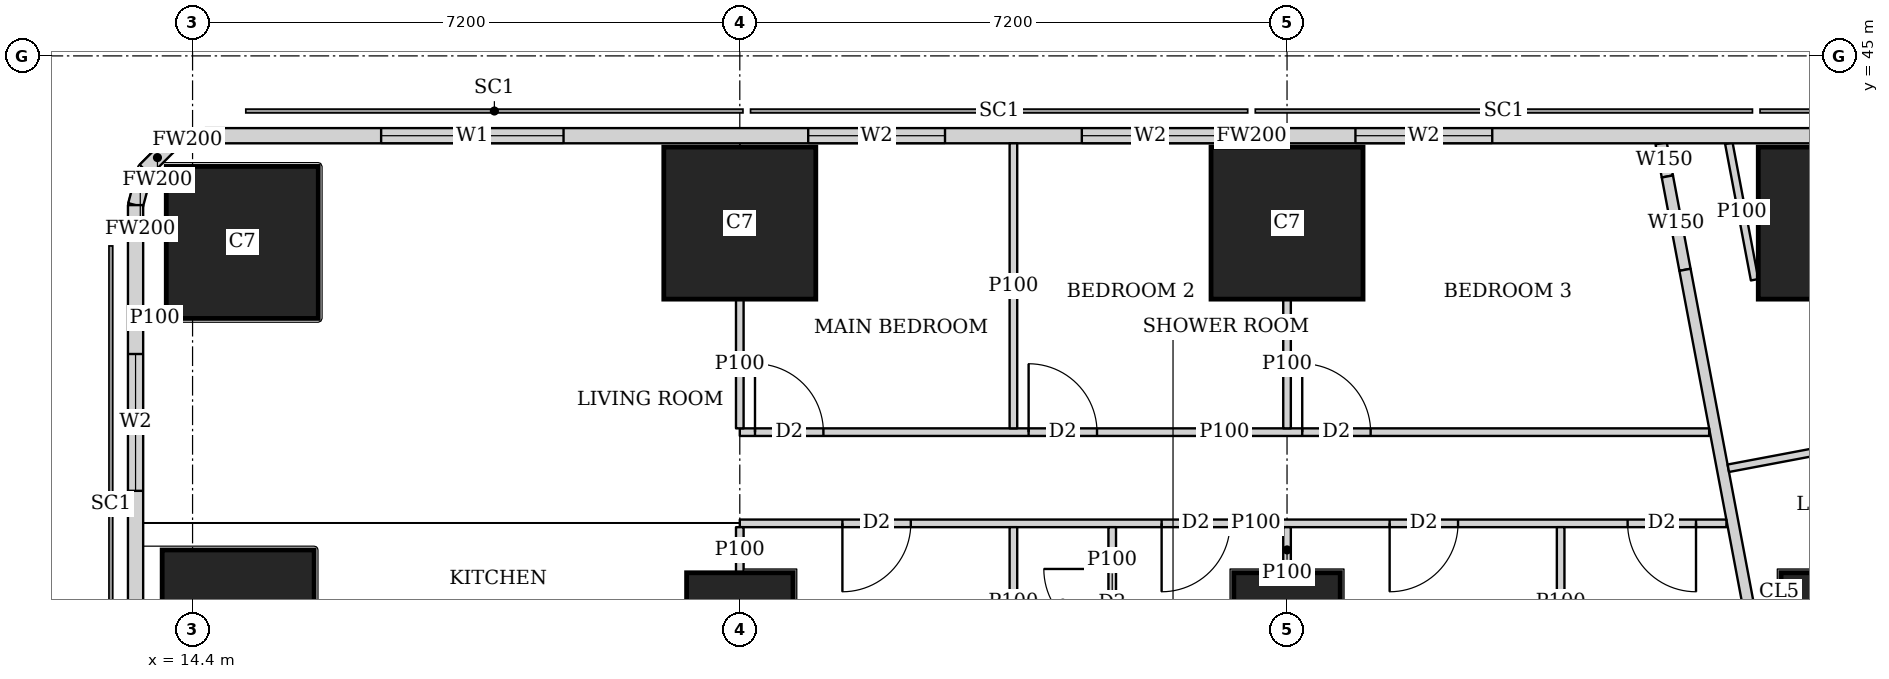
"""IFC4 building model, lengths in metres.
Left out: names, types, materials, properties, quantities, classifications, styles, units other than length and angle.
Written with IfcOpenShell. Run it as: python <this file> out.ifc"""

import sys

from ifc_helpers import new_model, si_unit, direction, frame, frame_2d, origin, origin_2d, place, context, subcontext, project, spatial, rectangle, extrude, element, fill, save


model = new_model("IFC4")
c1 = context("Model", 3, precision=1e-05, world=origin(), true_north=direction((0.0, 1.0)))
c2 = subcontext(c1, "Body", "Model", "MODEL_VIEW")
j1 = project(units=[si_unit("LENGTHUNIT", "METRE"), si_unit("PLANEANGLEUNIT", "RADIAN")], contexts=[c1])
p1 = place(None, origin())
s1 = spatial("IfcSite", under=j1, at=p1, CompositionType="ELEMENT")
p2 = place(p1, origin())
s2 = spatial("IfcBuilding", under=s1, at=p2, CompositionType="ELEMENT")
p3 = place(p2, frame((0.0, 0.0, 262.85)))
s3 = spatial("IfcBuildingStorey", under=s2, at=p3, CompositionType="ELEMENT", Elevation=262.85)
p4 = place(p3, frame((15.0, 37.5, 0.0), z_axis=(0.0, 0.0, 1.0), x_axis=(1.0, 0.0, 0.0)))
e1 = element("IfcColumn", 1, at=p4, inside=s3, PredefinedType="COLUMN", context=c2, shape_type="SweptSolid", body=[
    extrude(rectangle(XDim=2.0, YDim=2.0, at=origin_2d()), origin(), (0.0, 0.0, 1.0), 3.75),
])
for number, where, z_axis, x_axis in (
    (2, (21.6, 37.5, 0.0), (0.0, 0.0, 1.0), (1.0, 0.0, 0.0)),
    (3, (28.8, 37.5, 0.0), (0.0, 0.0, 1.0), (1.0, 0.0, 0.0)),
    (4, (36.0, 37.5, 0.0), (0.0, 0.0, 1.0), (1.0, 0.0, 0.0)),
):
    element("IfcColumn", number, at=place(p3, frame(where, z_axis=z_axis, x_axis=x_axis)), inside=s3, PredefinedType="COLUMN", context=c2, shape_type="SweptSolid", body=[
        extrude(rectangle(XDim=1.4, YDim=1.4, at=origin_2d()), origin(), (0.0, 0.0, 1.0), 3.75),
    ])
for number, where, z_axis, x_axis in (
    (5, (15.054, 42.546, 0.0), (0.0, 0.0, 1.0), (1.0, 0.0, 0.0)),
    (6, (21.6, 42.8, 0.0), (0.0, 0.0, 1.0), (1.0, 0.0, 0.0)),
    (7, (28.8, 42.8, 0.0), (0.0, 0.0, 1.0), (1.0, 0.0, 0.0)),
    (8, (36.0, 42.8, 0.0), (0.0, 0.0, 1.0), (1.0, 0.0, 0.0)),
):
    element("IfcColumn", number, at=place(p3, frame(where, z_axis=z_axis, x_axis=x_axis)), inside=s3, PredefinedType="COLUMN", context=c2, shape_type="SweptSolid", body=[
        extrude(rectangle(XDim=2.0, YDim=2.0, at=origin_2d()), origin(), (0.0, 0.0, 1.0), 3.75),
    ])
p5 = place(p3, frame((42.103, 43.95, 0.0), z_axis=(0.0, 0.0, 1.0), x_axis=(-1.0, 0.0, 0.0)))
e9 = element("IfcWall", 9, at=p5, inside=s3, PredefinedType="SOLIDWALL", context=c2, shape_type="SweptSolid", body=[
    extrude(rectangle(XDim=27.54, YDim=0.2, at=frame_2d((13.77, 0.0))), origin(), (0.0, 0.0, 1.0), 3.5),
])
p6 = place(p5, frame((10.603, 0.0, 0.9)))
e10 = element("IfcOpeningElement", 10, at=p6, cuts=e9, PredefinedType="OPENING", context=c2, shape_type="SweptSolid", body=[
    extrude(rectangle(XDim=1.8, YDim=1.5, at=frame_2d((0.9, 0.75))), frame((0.0, 0.11, 0.0), z_axis=(0.0, -1.0, 0.0), x_axis=(1.0, 0.0, 0.0)), (0.0, 0.0, 1.0), 0.22),
])
p7 = place(p5, frame((14.203, 0.0, 0.9)))
e11 = element("IfcOpeningElement", 11, at=p7, cuts=e9, PredefinedType="OPENING", context=c2, shape_type="SweptSolid", body=[
    extrude(rectangle(XDim=1.8, YDim=1.5, at=frame_2d((0.9, 0.75))), frame((0.0, 0.11, 0.0), z_axis=(0.0, -1.0, 0.0), x_axis=(1.0, 0.0, 0.0)), (0.0, 0.0, 1.0), 0.22),
])
p8 = place(p5, frame((17.803, 0.0, 0.9)))
e12 = element("IfcOpeningElement", 12, at=p8, cuts=e9, PredefinedType="OPENING", context=c2, shape_type="SweptSolid", body=[
    extrude(rectangle(XDim=1.8, YDim=1.5, at=frame_2d((0.9, 0.75))), frame((0.0, 0.11, 0.0), z_axis=(0.0, -1.0, 0.0), x_axis=(1.0, 0.0, 0.0)), (0.0, 0.0, 1.0), 0.22),
])
p9 = place(p5, frame((22.822, 0.0, 0.9)))
e13 = element("IfcOpeningElement", 13, at=p9, cuts=e9, PredefinedType="OPENING", context=c2, shape_type="SweptSolid", body=[
    extrude(rectangle(XDim=2.4, YDim=1.5, at=frame_2d((1.2, 0.75))), frame((0.0, 0.11, 0.0), z_axis=(0.0, -1.0, 0.0), x_axis=(1.0, 0.0, 0.0)), (0.0, 0.0, 1.0), 0.22),
])
p10 = place(p3, frame((14.563, 43.95, 0.0), z_axis=(0.0, 0.0, 1.0), x_axis=(-0.965655254015, -0.259826731483, 0.0)))
e14 = element("IfcWall", 14, at=p10, inside=s3, PredefinedType="SOLIDWALL", context=c2, shape_type="SweptSolid", body=[
    extrude(rectangle(XDim=0.477, YDim=0.2, at=frame_2d((0.239, 0.0))), origin(), (0.0, 0.0, 1.0), 3.5),
])
p11 = place(p3, frame((14.102, 43.826, 0.0), z_axis=(0.0, 0.0, 1.0), x_axis=(-0.707369890659, -0.706843573776, 0.0)))
e15 = element("IfcWall", 15, at=p11, inside=s3, PredefinedType="SOLIDWALL", context=c2, shape_type="SweptSolid", body=[
    extrude(rectangle(XDim=0.464, YDim=0.2, at=frame_2d((0.232, 0.0))), origin(), (0.0, 0.0, 1.0), 3.5),
])
p12 = place(p3, frame((13.774, 43.498, 0.0), z_axis=(0.0, 0.0, 1.0), x_axis=(-0.259826731483, -0.965655254015, 0.0)))
e16 = element("IfcWall", 16, at=p12, inside=s3, PredefinedType="SOLIDWALL", context=c2, shape_type="SweptSolid", body=[
    extrude(rectangle(XDim=0.477, YDim=0.2, at=frame_2d((0.239, 0.0))), origin(), (0.0, 0.0, 1.0), 3.5),
])
p13 = place(p3, frame((13.65, 43.037, 0.0), z_axis=(0.0, 0.0, 1.0), x_axis=(0.0, -1.0, 0.0)))
e17 = element("IfcWall", 17, at=p13, inside=s3, PredefinedType="SOLIDWALL", context=c2, shape_type="SweptSolid", body=[
    extrude(rectangle(XDim=35.374, YDim=0.2, at=frame_2d((17.687, 0.0))), origin(), (0.0, 0.0, 1.0), 3.5),
])
p14 = place(p13, frame((1.959, 0.0, 0.9)))
e18 = element("IfcOpeningElement", 18, at=p14, cuts=e17, PredefinedType="OPENING", context=c2, shape_type="SweptSolid", body=[
    extrude(rectangle(XDim=1.8, YDim=1.5, at=frame_2d((0.9, 0.75))), frame((0.0, 0.11, 0.0), z_axis=(0.0, -1.0, 0.0), x_axis=(1.0, 0.0, 0.0)), (0.0, 0.0, 1.0), 0.22),
])
p15 = place(p3, frame((33.722, 43.85, 0.0), z_axis=(0.0, 0.0, 1.0), x_axis=(0.184886516626, -0.982759877066, 0.0)))
e19 = element("IfcWall", 19, at=p15, inside=s3, PredefinedType="SOLIDWALL", context=c2, shape_type="SweptSolid", body=[
    extrude(rectangle(XDim=0.444, YDim=0.15, at=frame_2d((0.222, 0.0))), origin(), (0.0, 0.0, 1.0), 3.5),
])
p16 = place(p3, frame((33.804, 43.414, 0.0), z_axis=(0.0, 0.0, 1.0), x_axis=(0.185585816539, -0.982628060204, 0.0)))
e20 = element("IfcWall", 20, at=p16, inside=s3, PredefinedType="SOLIDWALL", context=c2, shape_type="SweptSolid", body=[
    extrude(rectangle(XDim=1.25, YDim=0.15, at=frame_2d((0.625, 0.0))), origin(), (0.0, 0.0, 1.0), 2.05),
])
p17 = place(p3, frame((34.036, 42.186, 0.0), z_axis=(0.0, 0.0, 1.0), x_axis=(0.185593518645, -0.9826266055, 0.0)))
e21 = element("IfcWall", 21, at=p17, inside=s3, PredefinedType="SOLIDWALL", context=c2, shape_type="SweptSolid", body=[
    extrude(rectangle(XDim=35.961, YDim=0.15, at=frame_2d((17.98, 0.0))), origin(), (0.0, 0.0, 1.0), 2.5),
])
p18 = place(p17, frame((15.529, 0.0, 0.0)))
e22 = element("IfcOpeningElement", 22, at=p18, cuts=e21, PredefinedType="OPENING", context=c2, shape_type="SweptSolid", body=[
    extrude(rectangle(XDim=1.0, YDim=2.1, at=frame_2d((0.5, 1.05))), frame((0.0, 0.085, 0.0), z_axis=(0.0, -1.0, 0.0), x_axis=(1.0, 0.0, 0.0)), (0.0, 0.0, 1.0), 0.17),
])
p19 = place(p17, frame((19.345, 0.0, 0.0)))
e23 = element("IfcOpeningElement", 23, at=p19, cuts=e21, PredefinedType="OPENING", context=c2, shape_type="SweptSolid", body=[
    extrude(rectangle(XDim=1.0, YDim=2.1, at=frame_2d((0.5, 1.05))), frame((0.0, 0.085, 0.0), z_axis=(0.0, -1.0, 0.0), x_axis=(1.0, 0.0, 0.0)), (0.0, 0.0, 1.0), 0.17),
])
p20 = place(p17, frame((30.594, 0.0, 0.0)))
e24 = element("IfcOpeningElement", 24, at=p20, cuts=e21, PredefinedType="OPENING", context=c2, shape_type="SweptSolid", body=[
    extrude(rectangle(XDim=1.0, YDim=2.1, at=frame_2d((0.5, 1.05))), frame((0.0, 0.085, 0.0), z_axis=(0.0, -1.0, 0.0), x_axis=(1.0, 0.0, 0.0)), (0.0, 0.0, 1.0), 0.17),
])
p21 = place(p3, frame((34.952, 42.055, 0.0), z_axis=(0.0, 0.0, 1.0), x_axis=(-0.185490642006, 0.98264603074, 0.0)))
e25 = element("IfcWall", 25, at=p21, inside=s3, PredefinedType="PARTITIONING", context=c2, shape_type="SweptSolid", body=[
    extrude(rectangle(XDim=1.827, YDim=0.1, at=frame_2d((0.914, 0.0))), origin(), (0.0, 0.0, 1.0), 2.05),
])
p22 = place(p3, frame((37.824, 40.182, 0.0), z_axis=(0.0, 0.0, 1.0), x_axis=(-0.982674977865, -0.185337227447, 0.0)))
e26 = element("IfcWall", 26, at=p22, inside=s3, PredefinedType="PARTITIONING", context=c2, shape_type="SweptSolid", body=[
    extrude(rectangle(XDim=3.275, YDim=0.1, at=frame_2d((1.637, 0.0))), origin(), (0.0, 0.0, 1.0), 3.5),
])
p23 = place(p3, frame((14.054, 41.546, 0.0), z_axis=(0.0, 0.0, 1.0), x_axis=(-1.0, 0.0, 0.0)))
e27 = element("IfcWall", 27, at=p23, inside=s3, PredefinedType="PARTITIONING", context=c2, shape_type="SweptSolid", body=[
    extrude(rectangle(XDim=0.304, YDim=0.1, at=frame_2d((0.152, 0.0))), origin(), (0.0, 0.0, 1.0), 3.5),
])
p24 = place(p3, frame((21.6, 40.05, 0.0), z_axis=(0.0, 0.0, 1.0), x_axis=(1.0, 0.0, 0.0)))
e28 = element("IfcWall", 28, at=p24, inside=s3, PredefinedType="PARTITIONING", context=c2, shape_type="SweptSolid", body=[
    extrude(rectangle(XDim=12.754, YDim=0.1, at=frame_2d((6.377, 0.0))), origin(), (0.0, 0.0, 1.0), 3.5),
])
p25 = place(p24, frame((0.2, 0.0, 0.0)))
e29 = element("IfcOpeningElement", 29, at=p25, cuts=e28, PredefinedType="OPENING", context=c2, shape_type="SweptSolid", body=[
    extrude(rectangle(XDim=0.9, YDim=2.1, at=frame_2d((0.45, 1.05))), frame((0.0, 0.06, 0.0), z_axis=(0.0, -1.0, 0.0), x_axis=(1.0, 0.0, 0.0)), (0.0, 0.0, 1.0), 0.12),
])
p26 = place(p24, frame((3.8, 0.0, 0.0)))
e30 = element("IfcOpeningElement", 30, at=p26, cuts=e28, PredefinedType="OPENING", context=c2, shape_type="SweptSolid", body=[
    extrude(rectangle(XDim=0.9, YDim=2.1, at=frame_2d((0.45, 1.05))), frame((0.0, 0.06, 0.0), z_axis=(0.0, -1.0, 0.0), x_axis=(1.0, 0.0, 0.0)), (0.0, 0.0, 1.0), 0.12),
])
p27 = place(p24, frame((7.4, 0.0, 0.0)))
e31 = element("IfcOpeningElement", 31, at=p27, cuts=e28, PredefinedType="OPENING", context=c2, shape_type="SweptSolid", body=[
    extrude(rectangle(XDim=0.9, YDim=2.1, at=frame_2d((0.45, 1.05))), frame((0.0, 0.06, 0.0), z_axis=(0.0, -1.0, 0.0), x_axis=(1.0, 0.0, 0.0)), (0.0, 0.0, 1.0), 0.12),
])
p28 = place(p3, frame((21.6, 38.85, 0.0), z_axis=(0.0, 0.0, 1.0), x_axis=(1.0, 0.0, 0.0)))
e32 = element("IfcWall", 32, at=p28, inside=s3, PredefinedType="PARTITIONING", context=c2, shape_type="SweptSolid", body=[
    extrude(rectangle(XDim=12.981, YDim=0.1, at=frame_2d((6.49, 0.0))), origin(), (0.0, 0.0, 1.0), 3.5),
])
p29 = place(p28, frame((1.35, 0.0, 0.0)))
e33 = element("IfcOpeningElement", 33, at=p29, cuts=e32, PredefinedType="OPENING", context=c2, shape_type="SweptSolid", body=[
    extrude(rectangle(XDim=0.9, YDim=2.1, at=frame_2d((0.45, 1.05))), frame((0.0, 0.06, 0.0), z_axis=(0.0, -1.0, 0.0), x_axis=(1.0, 0.0, 0.0)), (0.0, 0.0, 1.0), 0.12),
])
p30 = place(p28, frame((5.55, 0.0, 0.0)))
e34 = element("IfcOpeningElement", 34, at=p30, cuts=e32, PredefinedType="OPENING", context=c2, shape_type="SweptSolid", body=[
    extrude(rectangle(XDim=0.9, YDim=2.1, at=frame_2d((0.45, 1.05))), frame((0.0, 0.06, 0.0), z_axis=(0.0, -1.0, 0.0), x_axis=(1.0, 0.0, 0.0)), (0.0, 0.0, 1.0), 0.12),
])
p31 = place(p28, frame((8.55, 0.0, 0.0)))
e35 = element("IfcOpeningElement", 35, at=p31, cuts=e32, PredefinedType="OPENING", context=c2, shape_type="SweptSolid", body=[
    extrude(rectangle(XDim=0.9, YDim=2.1, at=frame_2d((0.45, 1.05))), frame((0.0, 0.06, 0.0), z_axis=(0.0, -1.0, 0.0), x_axis=(1.0, 0.0, 0.0)), (0.0, 0.0, 1.0), 0.12),
])
p32 = place(p28, frame((11.681, 0.0, 0.0)))
e36 = element("IfcOpeningElement", 36, at=p32, cuts=e32, PredefinedType="OPENING", context=c2, shape_type="SweptSolid", body=[
    extrude(rectangle(XDim=0.9, YDim=2.1, at=frame_2d((0.45, 1.05))), frame((0.0, 0.06, 0.0), z_axis=(0.0, -1.0, 0.0), x_axis=(1.0, 0.0, 0.0)), (0.0, 0.0, 1.0), 0.12),
])
p33 = place(p3, frame((21.6, 40.1, 0.0), z_axis=(0.0, 0.0, 1.0), x_axis=(0.0, 1.0, 0.0)))
e37 = element("IfcWall", 37, at=p33, inside=s3, PredefinedType="PARTITIONING", context=c2, shape_type="SweptSolid", body=[
    extrude(rectangle(XDim=1.699, YDim=0.1, at=frame_2d((0.85, 0.0))), origin(), (0.0, 0.0, 1.0), 3.5),
])
p34 = place(p3, frame((25.2, 40.1, 0.0), z_axis=(0.0, 0.0, 1.0), x_axis=(0.0, 1.0, 0.0)))
e38 = element("IfcWall", 38, at=p34, inside=s3, PredefinedType="PARTITIONING", context=c2, shape_type="SweptSolid", body=[
    extrude(rectangle(XDim=3.75, YDim=0.1, at=frame_2d((1.875, 0.0))), origin(), (0.0, 0.0, 1.0), 2.05),
])
p35 = place(p3, frame((28.8, 40.1, 0.0), z_axis=(0.0, 0.0, 1.0), x_axis=(0.0, 1.0, 0.0)))
e39 = element("IfcWall", 39, at=p35, inside=s3, PredefinedType="PARTITIONING", context=c2, shape_type="SweptSolid", body=[
    extrude(rectangle(XDim=1.699, YDim=0.1, at=frame_2d((0.85, 0.0))), origin(), (0.0, 0.0, 1.0), 3.5),
])
p36 = place(p3, frame((21.6, 38.201, 0.0), z_axis=(0.0, 0.0, 1.0), x_axis=(0.0, 1.0, 0.0)))
e40 = element("IfcWall", 40, at=p36, inside=s3, PredefinedType="PARTITIONING", context=c2, shape_type="SweptSolid", body=[
    extrude(rectangle(XDim=0.599, YDim=0.1, at=frame_2d((0.3, 0.0))), origin(), (0.0, 0.0, 1.0), 3.5),
])
p37 = place(p3, frame((25.2, 36.825, 0.0), z_axis=(0.0, 0.0, 1.0), x_axis=(0.0, 1.0, 0.0)))
e41 = element("IfcWall", 41, at=p37, inside=s3, PredefinedType="PARTITIONING", context=c2, shape_type="SweptSolid", body=[
    extrude(rectangle(XDim=1.975, YDim=0.1, at=frame_2d((0.988, 0.0))), origin(), (0.0, 0.0, 1.0), 3.5),
])
p38 = place(p3, frame((28.8, 38.201, 0.0), z_axis=(0.0, 0.0, 1.0), x_axis=(0.0, 1.0, 0.0)))
e42 = element("IfcWall", 42, at=p38, inside=s3, PredefinedType="PARTITIONING", context=c2, shape_type="SweptSolid", body=[
    extrude(rectangle(XDim=0.599, YDim=0.1, at=frame_2d((0.3, 0.0))), origin(), (0.0, 0.0, 1.0), 3.5),
])
p39 = place(p3, frame((32.4, 36.825, 0.0), z_axis=(0.0, 0.0, 1.0), x_axis=(0.0, 1.0, 0.0)))
e43 = element("IfcWall", 43, at=p39, inside=s3, PredefinedType="PARTITIONING", context=c2, shape_type="SweptSolid", body=[
    extrude(rectangle(XDim=1.975, YDim=0.1, at=frame_2d((0.988, 0.0))), origin(), (0.0, 0.0, 1.0), 3.5),
])
p40 = place(p3, frame((26.5, 36.825, 0.0), z_axis=(0.0, 0.0, 1.0), x_axis=(0.0, 1.0, 0.0)))
e44 = element("IfcWall", 44, at=p40, inside=s3, PredefinedType="PARTITIONING", context=c2, shape_type="SweptSolid", body=[
    extrude(rectangle(XDim=1.975, YDim=0.1, at=frame_2d((0.988, 0.0))), origin(), (0.0, 0.0, 1.0), 3.5),
])
p41 = place(p40, frame((0.525, 0.0, 0.0)))
e45 = element("IfcOpeningElement", 45, at=p41, cuts=e44, PredefinedType="OPENING", context=c2, shape_type="SweptSolid", body=[
    extrude(rectangle(XDim=0.9, YDim=2.1, at=frame_2d((0.45, 1.05))), frame((0.0, 0.06, 0.0), z_axis=(0.0, -1.0, 0.0), x_axis=(1.0, 0.0, 0.0)), (0.0, 0.0, 1.0), 0.12),
])
p42 = place(p6, origin())
e46 = element("IfcWindow", 46, at=p42, inside=s3, PartitioningType="SINGLE_PANEL", PredefinedType="WINDOW", context=c2, shape_type="SweptSolid", body=[
    extrude(rectangle(XDim=1.8, YDim=1.5, at=frame_2d((0.9, 0.75))), frame((0.0, 0.03, 0.0), z_axis=(0.0, -1.0, 0.0), x_axis=(1.0, 0.0, 0.0)), (0.0, 0.0, 1.0), 0.06),
])
fill(e10, e46)
p43 = place(p7, origin())
e47 = element("IfcWindow", 47, at=p43, inside=s3, PartitioningType="SINGLE_PANEL", PredefinedType="WINDOW", context=c2, shape_type="SweptSolid", body=[
    extrude(rectangle(XDim=1.8, YDim=1.5, at=frame_2d((0.9, 0.75))), frame((0.0, 0.03, 0.0), z_axis=(0.0, -1.0, 0.0), x_axis=(1.0, 0.0, 0.0)), (0.0, 0.0, 1.0), 0.06),
])
fill(e11, e47)
p44 = place(p8, origin())
e48 = element("IfcWindow", 48, at=p44, inside=s3, PartitioningType="SINGLE_PANEL", PredefinedType="WINDOW", context=c2, shape_type="SweptSolid", body=[
    extrude(rectangle(XDim=1.8, YDim=1.5, at=frame_2d((0.9, 0.75))), frame((0.0, 0.03, 0.0), z_axis=(0.0, -1.0, 0.0), x_axis=(1.0, 0.0, 0.0)), (0.0, 0.0, 1.0), 0.06),
])
fill(e12, e48)
p45 = place(p9, origin())
e49 = element("IfcWindow", 49, at=p45, inside=s3, PartitioningType="SINGLE_PANEL", PredefinedType="WINDOW", context=c2, shape_type="SweptSolid", body=[
    extrude(rectangle(XDim=2.4, YDim=1.5, at=frame_2d((1.2, 0.75))), frame((0.0, 0.03, 0.0), z_axis=(0.0, -1.0, 0.0), x_axis=(1.0, 0.0, 0.0)), (0.0, 0.0, 1.0), 0.06),
])
fill(e13, e49)
p46 = place(p14, origin())
e50 = element("IfcWindow", 50, at=p46, inside=s3, PartitioningType="SINGLE_PANEL", PredefinedType="WINDOW", context=c2, shape_type="SweptSolid", body=[
    extrude(rectangle(XDim=1.8, YDim=1.5, at=frame_2d((0.9, 0.75))), frame((0.0, 0.03, 0.0), z_axis=(0.0, -1.0, 0.0), x_axis=(1.0, 0.0, 0.0)), (0.0, 0.0, 1.0), 0.06),
])
fill(e18, e50)
p47 = place(p25, origin())
e51 = element("IfcDoor", 51, at=p47, inside=s3, OperationType="SINGLE_SWING_LEFT", PredefinedType="DOOR", context=c2, shape_type="SweptSolid", body=[
    extrude(rectangle(XDim=0.9, YDim=2.1, at=frame_2d((0.45, 1.05))), frame((0.0, 0.025, 0.0), z_axis=(0.0, -1.0, 0.0), x_axis=(1.0, 0.0, 0.0)), (0.0, 0.0, 1.0), 0.05),
])
fill(e29, e51)
p48 = place(p26, origin())
e52 = element("IfcDoor", 52, at=p48, inside=s3, OperationType="SINGLE_SWING_LEFT", PredefinedType="DOOR", context=c2, shape_type="SweptSolid", body=[
    extrude(rectangle(XDim=0.9, YDim=2.1, at=frame_2d((0.45, 1.05))), frame((0.0, 0.025, 0.0), z_axis=(0.0, -1.0, 0.0), x_axis=(1.0, 0.0, 0.0)), (0.0, 0.0, 1.0), 0.05),
])
fill(e30, e52)
p49 = place(p27, origin())
e53 = element("IfcDoor", 53, at=p49, inside=s3, OperationType="SINGLE_SWING_LEFT", PredefinedType="DOOR", context=c2, shape_type="SweptSolid", body=[
    extrude(rectangle(XDim=0.9, YDim=2.1, at=frame_2d((0.45, 1.05))), frame((0.0, 0.025, 0.0), z_axis=(0.0, -1.0, 0.0), x_axis=(1.0, 0.0, 0.0)), (0.0, 0.0, 1.0), 0.05),
])
fill(e31, e53)
p50 = place(p29, origin())
e54 = element("IfcDoor", 54, at=p50, inside=s3, OperationType="SINGLE_SWING_RIGHT", PredefinedType="DOOR", context=c2, shape_type="SweptSolid", body=[
    extrude(rectangle(XDim=0.9, YDim=2.1, at=frame_2d((0.45, 1.05))), frame((0.0, 0.025, 0.0), z_axis=(0.0, -1.0, 0.0), x_axis=(1.0, 0.0, 0.0)), (0.0, 0.0, 1.0), 0.05),
])
fill(e33, e54)
p51 = place(p30, origin())
e55 = element("IfcDoor", 55, at=p51, inside=s3, OperationType="SINGLE_SWING_RIGHT", PredefinedType="DOOR", context=c2, shape_type="SweptSolid", body=[
    extrude(rectangle(XDim=0.9, YDim=2.1, at=frame_2d((0.45, 1.05))), frame((0.0, 0.025, 0.0), z_axis=(0.0, -1.0, 0.0), x_axis=(1.0, 0.0, 0.0)), (0.0, 0.0, 1.0), 0.05),
])
fill(e34, e55)
p52 = place(p31, origin())
e56 = element("IfcDoor", 56, at=p52, inside=s3, OperationType="SINGLE_SWING_RIGHT", PredefinedType="DOOR", context=c2, shape_type="SweptSolid", body=[
    extrude(rectangle(XDim=0.9, YDim=2.1, at=frame_2d((0.45, 1.05))), frame((0.0, 0.025, 0.0), z_axis=(0.0, -1.0, 0.0), x_axis=(1.0, 0.0, 0.0)), (0.0, 0.0, 1.0), 0.05),
])
fill(e35, e56)
p53 = place(p32, origin())
e57 = element("IfcDoor", 57, at=p53, inside=s3, OperationType="SINGLE_SWING_LEFT", PredefinedType="DOOR", context=c2, shape_type="SweptSolid", body=[
    extrude(rectangle(XDim=0.9, YDim=2.1, at=frame_2d((0.45, 1.05))), frame((0.0, 0.025, 0.0), z_axis=(0.0, -1.0, 0.0), x_axis=(1.0, 0.0, 0.0)), (0.0, 0.0, 1.0), 0.05),
])
fill(e36, e57)
p54 = place(p41, origin())
e58 = element("IfcDoor", 58, at=p54, inside=s3, OperationType="SINGLE_SWING_RIGHT", PredefinedType="DOOR", context=c2, shape_type="SweptSolid", body=[
    extrude(rectangle(XDim=0.9, YDim=2.1, at=frame_2d((0.45, 1.05))), frame((0.0, 0.025, 0.0), z_axis=(0.0, -1.0, 0.0), x_axis=(1.0, 0.0, 0.0)), (0.0, 0.0, 1.0), 0.05),
])
fill(e45, e58)
save(model, sys.argv[1])
